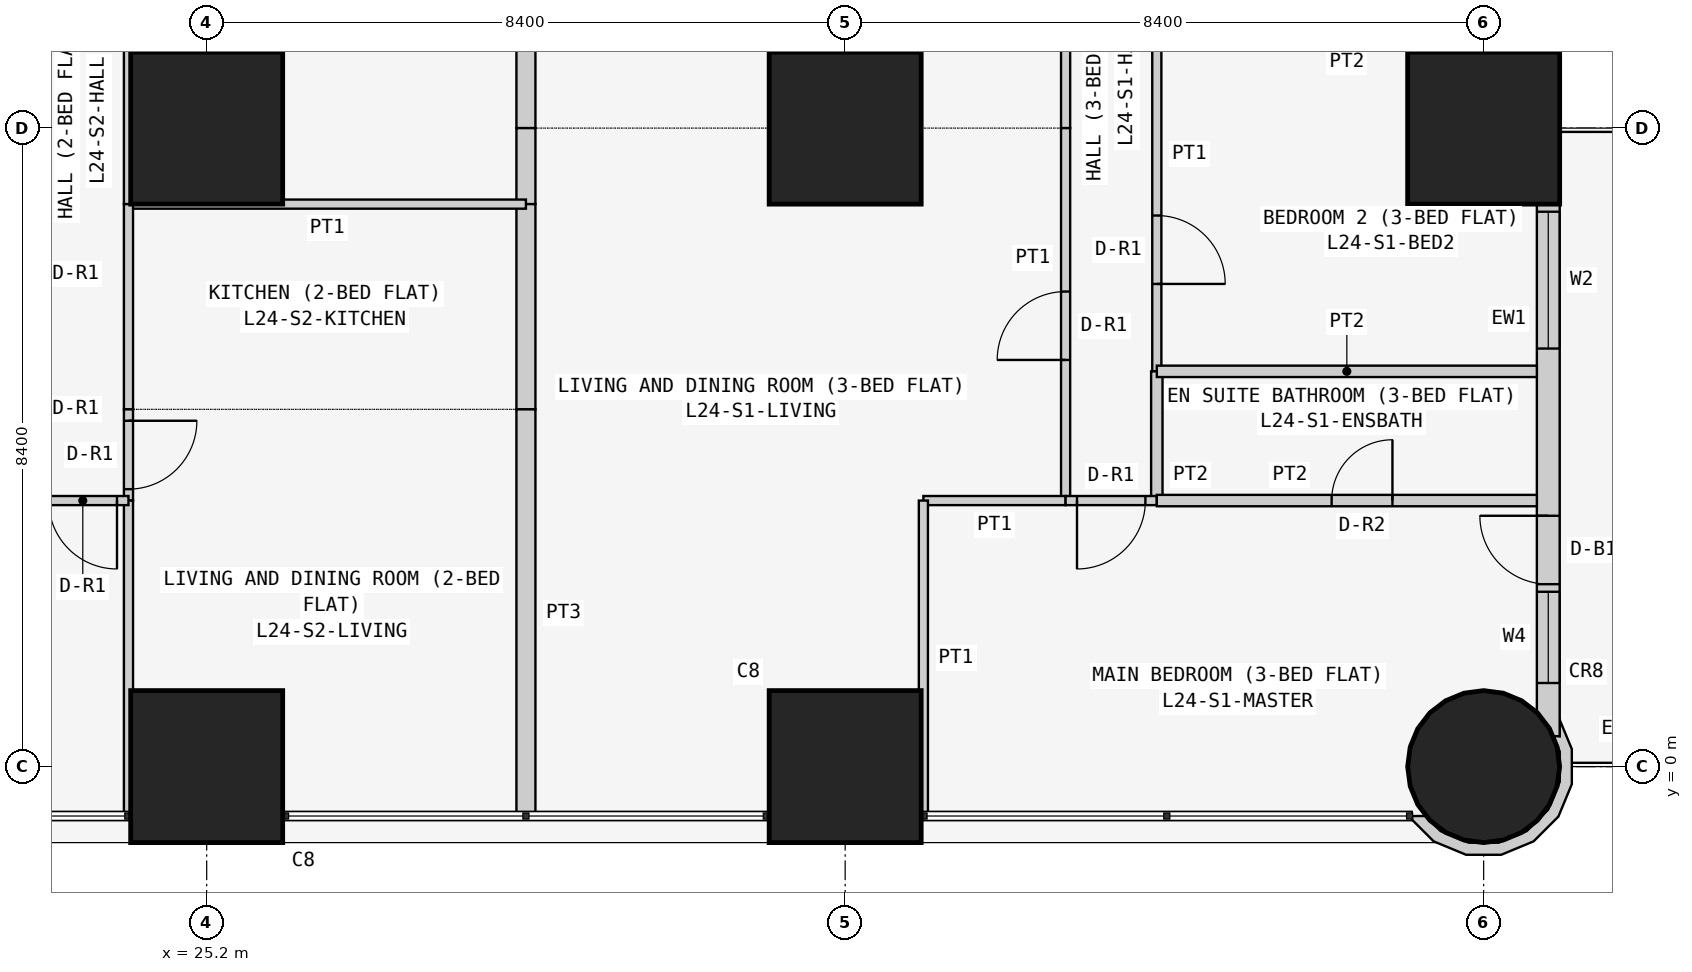
"""IFC4 building model, lengths in metres.
Left out: names, types, materials, properties, quantities, classifications, styles, units other than length and angle.
Written with IfcOpenShell. Run it as: python <this file> out.ifc"""

import sys

from ifc_helpers import new_model, si_unit, direction, frame, frame_2d, origin, origin_2d, place, context, subcontext, project, spatial, polyline, rectangle, circle, outline, extrude, element, fill, save


model = new_model("IFC4")
c1 = context("Model", 3, precision=1e-05, world=origin(), true_north=direction((0.0, 1.0)))
c2 = subcontext(c1, "Body", "Model", "MODEL_VIEW")
j1 = project(units=[si_unit("LENGTHUNIT", "METRE"), si_unit("PLANEANGLEUNIT", "RADIAN")], contexts=[c1])
p1 = place(None, origin())
s1 = spatial("IfcSite", under=j1, at=p1, CompositionType="ELEMENT")
p2 = place(p1, origin())
s2 = spatial("IfcBuilding", under=s1, at=p2, CompositionType="ELEMENT")
p3 = place(p2, frame((0.0, 0.0, 95.7)))
s3 = spatial("IfcBuildingStorey", under=s2, at=p3, CompositionType="ELEMENT", Elevation=95.7)
for number, where, z_axis, x_axis in (
    (1, (25.2, 0.0, 0.0), (0.0, 0.0, 1.0), (1.0, 0.0, 0.0)),
    (2, (25.2, 8.4, 0.0), (0.0, 0.0, 1.0), (1.0, 0.0, 0.0)),
    (3, (33.6, 0.0, 0.0), (0.0, 0.0, 1.0), (1.0, 0.0, 0.0)),
    (4, (33.6, 8.4, 0.0), (0.0, 0.0, 1.0), (1.0, 0.0, 0.0)),
):
    element("IfcColumn", number, at=place(p3, frame(where, z_axis=z_axis, x_axis=x_axis)), inside=s3, PredefinedType="COLUMN", context=c2, shape_type="SweptSolid", body=[
        extrude(rectangle(XDim=2.0, YDim=2.0, at=origin_2d()), origin(), (0.0, 0.0, 1.0), 3.6),
    ])
p4 = place(p3, frame((42.0, 0.0, 0.0), z_axis=(0.0, 0.0, 1.0), x_axis=(1.0, 0.0, 0.0)))
e5 = element("IfcColumn", 5, at=p4, inside=s3, PredefinedType="COLUMN", context=c2, shape_type="SweptSolid", body=[
    extrude(circle(Radius=1.0, at=origin_2d()), origin(), (0.0, 0.0, 1.0), 3.6),
])
p5 = place(p3, frame((42.0, 8.4, 0.0), z_axis=(0.0, 0.0, 1.0), x_axis=(1.0, 0.0, 0.0)))
e6 = element("IfcColumn", 6, at=p5, inside=s3, PredefinedType="COLUMN", context=c2, shape_type="SweptSolid", body=[
    extrude(rectangle(XDim=2.0, YDim=2.0, at=origin_2d()), origin(), (0.0, 0.0, 1.0), 3.6),
])
p6 = place(p3, frame((42.85, 0.4, 0.0), z_axis=(0.0, 0.0, 1.0), x_axis=(0.0, 1.0, 0.0)))
e7 = element("IfcWall", 7, at=p6, inside=s3, PredefinedType="SOLIDWALL", context=c2, shape_type="SweptSolid", body=[
    extrude(rectangle(XDim=15.7, YDim=0.3, at=frame_2d((7.85, 0.0))), origin(), (0.0, 0.0, 1.0), 3.45),
])
p7 = place(p6, frame((12.4, 0.0, 0.9)))
e8 = element("IfcOpeningElement", 8, at=p7, cuts=e7, PredefinedType="OPENING", context=c2, shape_type="SweptSolid", body=[
    extrude(rectangle(XDim=1.8, YDim=1.5, at=frame_2d((0.9, 0.75))), frame((0.0, 0.16, 0.0), z_axis=(0.0, -1.0, 0.0), x_axis=(1.0, 0.0, 0.0)), (0.0, 0.0, 1.0), 0.32),
])
p8 = place(p6, frame((9.55, 0.0, 1.5)))
e9 = element("IfcOpeningElement", 9, at=p8, cuts=e7, PredefinedType="OPENING", context=c2, shape_type="SweptSolid", body=[
    extrude(rectangle(XDim=0.9, YDim=0.7, at=frame_2d((0.45, 0.35))), frame((0.0, 0.16, 0.0), z_axis=(0.0, -1.0, 0.0), x_axis=(1.0, 0.0, 0.0)), (0.0, 0.0, 1.0), 0.32),
])
p9 = place(p6, frame((5.1, 0.0, 0.9)))
e10 = element("IfcOpeningElement", 10, at=p9, cuts=e7, PredefinedType="OPENING", context=c2, shape_type="SweptSolid", body=[
    extrude(rectangle(XDim=1.8, YDim=1.5, at=frame_2d((0.9, 0.75))), frame((0.0, 0.16, 0.0), z_axis=(0.0, -1.0, 0.0), x_axis=(1.0, 0.0, 0.0)), (0.0, 0.0, 1.0), 0.32),
])
p10 = place(p6, frame((2.0, 0.0, 0.0)))
e11 = element("IfcOpeningElement", 11, at=p10, cuts=e7, PredefinedType="OPENING", context=c2, shape_type="SweptSolid", body=[
    extrude(rectangle(XDim=0.9, YDim=2.4, at=frame_2d((0.45, 1.2))), frame((0.0, 0.16, 0.0), z_axis=(0.0, -1.0, 0.0), x_axis=(1.0, 0.0, 0.0)), (0.0, 0.0, 1.0), 0.32),
])
p11 = place(p6, frame((0.7, 0.0, 0.9)))
e12 = element("IfcOpeningElement", 12, at=p11, cuts=e7, PredefinedType="OPENING", context=c2, shape_type="SweptSolid", body=[
    extrude(rectangle(XDim=1.2, YDim=1.5, at=frame_2d((0.6, 0.75))), frame((0.0, 0.16, 0.0), z_axis=(0.0, -1.0, 0.0), x_axis=(1.0, 0.0, 0.0)), (0.0, 0.0, 1.0), 0.32),
])
p12 = place(p3, frame((41.132, -0.643, 0.0), z_axis=(0.0, 0.0, 1.0), x_axis=(0.555974394895, -0.831199417842, 0.0)))
e13 = element("IfcWall", 13, at=p12, inside=s3, PredefinedType="SOLIDWALL", context=c2, shape_type="SweptSolid", body=[
    extrude(outline(polyline([(0.171, 2.132), (0.113, 2.066), (0.339, 2.022), (0.67, 1.8), (0.891, 1.469), (0.968, 1.078), (0.89, 0.688), (0.669, 0.357), (0.338, 0.136), (0.062, 0.081), (-0.036, -0.066), (0.005, -0.093), (0.4, -0.014), (0.783, 0.242), (1.04, 0.626), (1.13, 1.078), (1.04, 1.531), (0.784, 1.915), (0.401, 2.171), (-0.009, 2.253), (0.171, 2.132)])), origin(), (0.0, 0.0, 1.0), 3.45),
])
p13 = place(p3, frame((36.5, 11.4, 0.0), z_axis=(0.0, 0.0, 1.0), x_axis=(0.0, -1.0, 0.0)))
e14 = element("IfcWall", 14, at=p13, inside=s3, PredefinedType="PARTITIONING", context=c2, shape_type="SweptSolid", body=[
    extrude(rectangle(XDim=3.0, YDim=0.12, at=frame_2d((1.5, 0.0))), origin(), (0.0, 0.0, 1.0), 3.45),
])
p14 = place(p3, frame((29.4, 8.4, 0.0), z_axis=(0.0, 0.0, 1.0), x_axis=(0.0, 1.0, 0.0)))
e15 = element("IfcWall", 15, at=p14, inside=s3, PredefinedType="PARTITIONING", context=c2, shape_type="SweptSolid", body=[
    extrude(rectangle(XDim=3.8, YDim=0.25, at=frame_2d((1.9, 0.0))), origin(), (0.0, 0.0, 1.0), 2.848),
])
p15 = place(p3, frame((36.5, 8.4, 0.0), z_axis=(0.0, 0.0, 1.0), x_axis=(0.0, -1.0, 0.0)))
e16 = element("IfcWall", 16, at=p15, inside=s3, PredefinedType="PARTITIONING", context=c2, shape_type="SweptSolid", body=[
    extrude(rectangle(XDim=4.9, YDim=0.12, at=frame_2d((2.45, 0.0))), origin(), (0.0, 0.0, 1.0), 3.45),
])
p16 = place(p15, frame((2.15, 0.0, 0.0)))
e17 = element("IfcOpeningElement", 17, at=p16, cuts=e16, PredefinedType="OPENING", context=c2, shape_type="SweptSolid", body=[
    extrude(rectangle(XDim=0.9, YDim=2.1, at=frame_2d((0.45, 1.05))), frame((0.0, 0.07, 0.0), z_axis=(0.0, -1.0, 0.0), x_axis=(1.0, 0.0, 0.0)), (0.0, 0.0, 1.0), 0.14),
])
p17 = place(p3, frame((36.5, 3.5, 0.0), z_axis=(0.0, 0.0, 1.0), x_axis=(-1.0, 0.0, 0.0)))
e18 = element("IfcWall", 18, at=p17, inside=s3, PredefinedType="PARTITIONING", context=c2, shape_type="SweptSolid", body=[
    extrude(rectangle(XDim=1.871, YDim=0.12, at=frame_2d((0.936, 0.0))), origin(), (0.0, 0.0, 1.0), 3.45),
])
p18 = place(p3, frame((34.629, 3.5, 0.0), z_axis=(0.0, 0.0, 1.0), x_axis=(0.0, -1.0, 0.0)))
e19 = element("IfcWall", 19, at=p18, inside=s3, PredefinedType="PARTITIONING", context=c2, shape_type="SweptSolid", body=[
    extrude(rectangle(XDim=4.15, YDim=0.12, at=frame_2d((2.075, 0.0))), origin(), (0.0, 0.0, 1.0), 3.45),
])
p19 = place(p3, frame((29.4, 7.4, 0.0), z_axis=(0.0, 0.0, 1.0), x_axis=(0.0, 1.0, 0.0)))
e20 = element("IfcWall", 20, at=p19, inside=s3, PredefinedType="PARTITIONING", context=c2, shape_type="SweptSolid", body=[
    extrude(rectangle(XDim=1.0, YDim=0.25, at=frame_2d((0.5, 0.0))), origin(), (0.0, 0.0, 1.0), 2.848),
])
p20 = place(p3, frame((29.4, 4.7, 0.0), z_axis=(0.0, 0.0, 1.0), x_axis=(0.0, 1.0, 0.0)))
e21 = element("IfcWall", 21, at=p20, inside=s3, PredefinedType="PARTITIONING", context=c2, shape_type="SweptSolid", body=[
    extrude(rectangle(XDim=2.7, YDim=0.25, at=frame_2d((1.35, 0.0))), origin(), (0.0, 0.0, 1.0), 2.848),
])
p21 = place(p3, frame((29.4, -0.65, 0.0), z_axis=(0.0, 0.0, 1.0), x_axis=(0.0, 1.0, 0.0)))
e22 = element("IfcWall", 22, at=p21, inside=s3, PredefinedType="PARTITIONING", context=c2, shape_type="SweptSolid", body=[
    extrude(rectangle(XDim=5.35, YDim=0.25, at=frame_2d((2.675, 0.0))), origin(), (0.0, 0.0, 1.0), 2.848),
])
p22 = place(p3, frame((37.7, 5.2, 0.0), z_axis=(0.0, 0.0, 1.0), x_axis=(0.0, 1.0, 0.0)))
e23 = element("IfcWall", 23, at=p22, inside=s3, PredefinedType="PARTITIONING", context=c2, shape_type="SweptSolid", body=[
    extrude(rectangle(XDim=4.4, YDim=0.12, at=frame_2d((2.2, 0.0))), origin(), (0.0, 0.0, 1.0), 3.45),
])
p23 = place(p22, frame((1.15, 0.0, 0.0)))
e24 = element("IfcOpeningElement", 24, at=p23, cuts=e23, PredefinedType="OPENING", context=c2, shape_type="SweptSolid", body=[
    extrude(rectangle(XDim=0.9, YDim=2.1, at=frame_2d((0.45, 1.05))), frame((0.0, 0.07, 0.0), z_axis=(0.0, -1.0, 0.0), x_axis=(1.0, 0.0, 0.0)), (0.0, 0.0, 1.0), 0.14),
])
p24 = place(p3, frame((37.7, 3.5, 0.0), z_axis=(0.0, 0.0, 1.0), x_axis=(0.0, 1.0, 0.0)))
e25 = element("IfcWall", 25, at=p24, inside=s3, PredefinedType="PARTITIONING", context=c2, shape_type="SweptSolid", body=[
    extrude(rectangle(XDim=1.7, YDim=0.15, at=frame_2d((0.85, 0.0))), origin(), (0.0, 0.0, 1.0), 3.45),
])
p25 = place(p3, frame((36.5, 3.5, 0.0), z_axis=(0.0, 0.0, 1.0), x_axis=(1.0, 0.0, 0.0)))
e26 = element("IfcWall", 26, at=p25, inside=s3, PredefinedType="PARTITIONING", context=c2, shape_type="SweptSolid", body=[
    extrude(rectangle(XDim=1.2, YDim=0.12, at=frame_2d((0.6, 0.0))), origin(), (0.0, 0.0, 1.0), 3.45),
])
p26 = place(p25, frame((0.15, 0.0, 0.0)))
e27 = element("IfcOpeningElement", 27, at=p26, cuts=e26, PredefinedType="OPENING", context=c2, shape_type="SweptSolid", body=[
    extrude(rectangle(XDim=0.9, YDim=2.1, at=frame_2d((0.45, 1.05))), frame((0.0, 0.07, 0.0), z_axis=(0.0, -1.0, 0.0), x_axis=(1.0, 0.0, 0.0)), (0.0, 0.0, 1.0), 0.14),
])
p27 = place(p3, frame((37.7, 5.2, 0.0), z_axis=(0.0, 0.0, 1.0), x_axis=(1.0, 0.0, 0.0)))
e28 = element("IfcWall", 28, at=p27, inside=s3, PredefinedType="PARTITIONING", context=c2, shape_type="SweptSolid", body=[
    extrude(rectangle(XDim=5.0, YDim=0.15, at=frame_2d((2.5, 0.0))), origin(), (0.0, 0.0, 1.0), 3.45),
])
p28 = place(p3, frame((37.7, 3.5, 0.0), z_axis=(0.0, 0.0, 1.0), x_axis=(1.0, 0.0, 0.0)))
e29 = element("IfcWall", 29, at=p28, inside=s3, PredefinedType="PARTITIONING", context=c2, shape_type="SweptSolid", body=[
    extrude(rectangle(XDim=5.0, YDim=0.15, at=frame_2d((2.5, 0.0))), origin(), (0.0, 0.0, 1.0), 3.45),
])
p29 = place(p28, frame((2.3, 0.0, 0.0)))
e30 = element("IfcOpeningElement", 30, at=p29, cuts=e29, PredefinedType="OPENING", context=c2, shape_type="SweptSolid", body=[
    extrude(rectangle(XDim=0.8, YDim=2.1, at=frame_2d((0.4, 1.05))), frame((0.0, 0.085, 0.0), z_axis=(0.0, -1.0, 0.0), x_axis=(1.0, 0.0, 0.0)), (0.0, 0.0, 1.0), 0.17),
])
p30 = place(p3, frame((29.4, 7.4, 0.0), z_axis=(0.0, 0.0, 1.0), x_axis=(-1.0, 0.0, 0.0)))
e31 = element("IfcWall", 31, at=p30, inside=s3, PredefinedType="PARTITIONING", context=c2, shape_type="SweptSolid", body=[
    extrude(rectangle(XDim=5.229, YDim=0.12, at=frame_2d((2.615, 0.0))), origin(), (0.0, 0.0, 1.0), 3.45),
])
p31 = place(p3, frame((24.171, 7.4, 0.0), z_axis=(0.0, 0.0, 1.0), x_axis=(0.0, 1.0, 0.0)))
e32 = element("IfcWall", 32, at=p31, inside=s3, PredefinedType="PARTITIONING", context=c2, shape_type="SweptSolid", body=[
    extrude(rectangle(XDim=4.8, YDim=0.12, at=frame_2d((2.4, 0.0))), origin(), (0.0, 0.0, 1.0), 3.45),
])
p32 = place(p31, frame((2.85, 0.0, 0.0)))
e33 = element("IfcOpeningElement", 33, at=p32, cuts=e32, PredefinedType="OPENING", context=c2, shape_type="SweptSolid", body=[
    extrude(rectangle(XDim=0.9, YDim=2.1, at=frame_2d((0.45, 1.05))), frame((0.0, 0.07, 0.0), z_axis=(0.0, -1.0, 0.0), x_axis=(1.0, 0.0, 0.0)), (0.0, 0.0, 1.0), 0.14),
])
p33 = place(p3, frame((24.171, 4.7, 0.0), z_axis=(0.0, 0.0, 1.0), x_axis=(0.0, 1.0, 0.0)))
e34 = element("IfcWall", 34, at=p33, inside=s3, PredefinedType="PARTITIONING", context=c2, shape_type="SweptSolid", body=[
    extrude(rectangle(XDim=2.7, YDim=0.12, at=frame_2d((1.35, 0.0))), origin(), (0.0, 0.0, 1.0), 3.45),
])
p34 = place(p3, frame((24.171, 3.5, 0.0), z_axis=(0.0, 0.0, 1.0), x_axis=(0.0, 1.0, 0.0)))
e35 = element("IfcWall", 35, at=p34, inside=s3, PredefinedType="PARTITIONING", context=c2, shape_type="SweptSolid", body=[
    extrude(rectangle(XDim=1.2, YDim=0.12, at=frame_2d((0.6, 0.0))), origin(), (0.0, 0.0, 1.0), 3.45),
])
p35 = place(p34, frame((0.15, 0.0, 0.0)))
e36 = element("IfcOpeningElement", 36, at=p35, cuts=e35, PredefinedType="OPENING", context=c2, shape_type="SweptSolid", body=[
    extrude(rectangle(XDim=0.9, YDim=2.1, at=frame_2d((0.45, 1.05))), frame((0.0, 0.07, 0.0), z_axis=(0.0, -1.0, 0.0), x_axis=(1.0, 0.0, 0.0)), (0.0, 0.0, 1.0), 0.14),
])
p36 = place(p3, frame((24.171, -0.65, 0.0), z_axis=(0.0, 0.0, 1.0), x_axis=(0.0, 1.0, 0.0)))
e37 = element("IfcWall", 37, at=p36, inside=s3, PredefinedType="PARTITIONING", context=c2, shape_type="SweptSolid", body=[
    extrude(rectangle(XDim=4.15, YDim=0.12, at=frame_2d((2.075, 0.0))), origin(), (0.0, 0.0, 1.0), 3.45),
])
p37 = place(p3, frame((24.171, 3.5, 0.0), z_axis=(0.0, 0.0, 1.0), x_axis=(-1.0, 0.0, 0.0)))
e38 = element("IfcWall", 38, at=p37, inside=s3, PredefinedType="PARTITIONING", context=c2, shape_type="SweptSolid", body=[
    extrude(rectangle(XDim=1.2, YDim=0.12, at=frame_2d((0.6, 0.0))), origin(), (0.0, 0.0, 1.0), 3.45),
])
p38 = place(p37, frame((0.151, 0.0, 0.0)))
e39 = element("IfcOpeningElement", 39, at=p38, cuts=e38, PredefinedType="OPENING", context=c2, shape_type="SweptSolid", body=[
    extrude(rectangle(XDim=0.9, YDim=2.1, at=frame_2d((0.45, 1.05))), frame((0.0, 0.07, 0.0), z_axis=(0.0, -1.0, 0.0), x_axis=(1.0, 0.0, 0.0)), (0.0, 0.0, 1.0), 0.14),
])
p39 = place(p9, origin())
e40 = element("IfcWindow", 40, at=p39, inside=s3, PartitioningType="SINGLE_PANEL", PredefinedType="WINDOW", context=c2, shape_type="SweptSolid", body=[
    extrude(rectangle(XDim=1.8, YDim=1.5, at=frame_2d((0.9, 0.75))), frame((0.0, 0.03, 0.0), z_axis=(0.0, -1.0, 0.0), x_axis=(1.0, 0.0, 0.0)), (0.0, 0.0, 1.0), 0.06),
])
fill(e10, e40)
p40 = place(p10, origin())
e41 = element("IfcDoor", 41, at=p40, inside=s3, OperationType="SINGLE_SWING_RIGHT", PredefinedType="DOOR", context=c2, shape_type="SweptSolid", body=[
    extrude(rectangle(XDim=0.9, YDim=2.4, at=frame_2d((0.45, 1.2))), frame((0.0, 0.025, 0.0), z_axis=(0.0, -1.0, 0.0), x_axis=(1.0, 0.0, 0.0)), (0.0, 0.0, 1.0), 0.05),
])
fill(e11, e41)
p41 = place(p11, origin())
e42 = element("IfcWindow", 42, at=p41, inside=s3, PartitioningType="SINGLE_PANEL", PredefinedType="WINDOW", context=c2, shape_type="SweptSolid", body=[
    extrude(rectangle(XDim=1.2, YDim=1.5, at=frame_2d((0.6, 0.75))), frame((0.0, 0.03, 0.0), z_axis=(0.0, -1.0, 0.0), x_axis=(1.0, 0.0, 0.0)), (0.0, 0.0, 1.0), 0.06),
])
fill(e12, e42)
p42 = place(p16, frame((0.9, 0.0, 0.0), z_axis=(0.0, 0.0, 1.0), x_axis=(-1.0, 0.0, 0.0)))
e43 = element("IfcDoor", 43, at=p42, inside=s3, OperationType="SINGLE_SWING_LEFT", PredefinedType="DOOR", context=c2, shape_type="SweptSolid", body=[
    extrude(rectangle(XDim=0.9, YDim=2.1, at=frame_2d((0.45, 1.05))), frame((0.0, 0.025, 0.0), z_axis=(0.0, -1.0, 0.0), x_axis=(1.0, 0.0, 0.0)), (0.0, 0.0, 1.0), 0.05),
])
fill(e17, e43)
p43 = place(p23, frame((0.9, 0.0, 0.0), z_axis=(0.0, 0.0, 1.0), x_axis=(-1.0, 0.0, 0.0)))
e44 = element("IfcDoor", 44, at=p43, inside=s3, OperationType="SINGLE_SWING_RIGHT", PredefinedType="DOOR", context=c2, shape_type="SweptSolid", body=[
    extrude(rectangle(XDim=0.9, YDim=2.1, at=frame_2d((0.45, 1.05))), frame((0.0, 0.025, 0.0), z_axis=(0.0, -1.0, 0.0), x_axis=(1.0, 0.0, 0.0)), (0.0, 0.0, 1.0), 0.05),
])
fill(e24, e44)
p44 = place(p26, frame((0.9, 0.0, 0.0), z_axis=(0.0, 0.0, 1.0), x_axis=(-1.0, 0.0, 0.0)))
e45 = element("IfcDoor", 45, at=p44, inside=s3, OperationType="SINGLE_SWING_RIGHT", PredefinedType="DOOR", context=c2, shape_type="SweptSolid", body=[
    extrude(rectangle(XDim=0.9, YDim=2.1, at=frame_2d((0.45, 1.05))), frame((0.0, 0.025, 0.0), z_axis=(0.0, -1.0, 0.0), x_axis=(1.0, 0.0, 0.0)), (0.0, 0.0, 1.0), 0.05),
])
fill(e27, e45)
p45 = place(p29, origin())
e46 = element("IfcDoor", 46, at=p45, inside=s3, OperationType="SINGLE_SWING_RIGHT", PredefinedType="DOOR", context=c2, shape_type="SweptSolid", body=[
    extrude(rectangle(XDim=0.8, YDim=2.1, at=frame_2d((0.4, 1.05))), frame((0.0, 0.025, 0.0), z_axis=(0.0, -1.0, 0.0), x_axis=(1.0, 0.0, 0.0)), (0.0, 0.0, 1.0), 0.05),
])
fill(e30, e46)
p46 = place(p35, frame((0.9, 0.0, 0.0), z_axis=(0.0, 0.0, 1.0), x_axis=(-1.0, 0.0, 0.0)))
e47 = element("IfcDoor", 47, at=p46, inside=s3, OperationType="SINGLE_SWING_LEFT", PredefinedType="DOOR", context=c2, shape_type="SweptSolid", body=[
    extrude(rectangle(XDim=0.9, YDim=2.1, at=frame_2d((0.45, 1.05))), frame((0.0, 0.025, 0.0), z_axis=(0.0, -1.0, 0.0), x_axis=(1.0, 0.0, 0.0)), (0.0, 0.0, 1.0), 0.05),
])
fill(e36, e47)
p47 = place(p38, origin())
e48 = element("IfcDoor", 48, at=p47, inside=s3, OperationType="SINGLE_SWING_LEFT", PredefinedType="DOOR", context=c2, shape_type="SweptSolid", body=[
    extrude(rectangle(XDim=0.9, YDim=2.1, at=frame_2d((0.45, 1.05))), frame((0.0, 0.025, 0.0), z_axis=(0.0, -1.0, 0.0), x_axis=(1.0, 0.0, 0.0)), (0.0, 0.0, 1.0), 0.05),
])
fill(e39, e48)
save(model, sys.argv[1])
